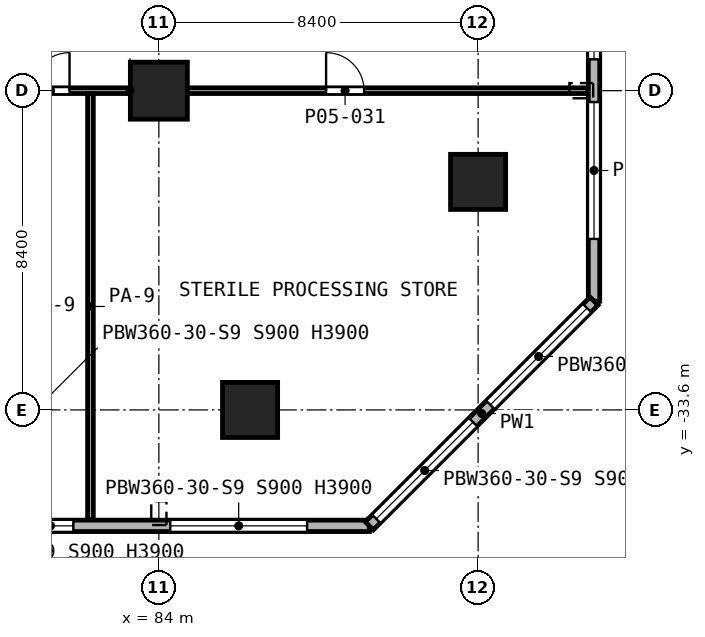
"""IFC4 building model, lengths in metres.
Left out: names, types, materials, properties, quantities, classifications, styles, units other than length and angle.
Written with IfcOpenShell. Run it as: python <this file> out.ifc"""

import sys

from ifc_helpers import new_model, si_unit, direction, frame, frame_2d, origin, origin_2d, place, context, subcontext, project, spatial, rectangle, extrude, element, fill, save


model = new_model("IFC4")
c1 = context("Model", 3, precision=1e-05, world=origin(), true_north=direction((0.0, 1.0)))
c2 = subcontext(c1, "Body", "Model", "MODEL_VIEW")
j1 = project(units=[si_unit("LENGTHUNIT", "METRE"), si_unit("PLANEANGLEUNIT", "RADIAN")], contexts=[c1])
p1 = place(None, origin())
s1 = spatial("IfcSite", under=j1, at=p1, CompositionType="ELEMENT")
p2 = place(p1, origin())
s2 = spatial("IfcBuilding", under=s1, at=p2, CompositionType="ELEMENT")
p3 = place(p2, frame((0.0, 0.0, 23.8)))
s3 = spatial("IfcBuildingStorey", under=s2, at=p3, CompositionType="ELEMENT", Elevation=23.8)
p4 = place(p3, frame((84.0, -25.2, 0.0), z_axis=(0.0, 0.0, 1.0), x_axis=(1.0, 0.0, 0.0)))
e1 = element("IfcColumn", 1, at=p4, inside=s3, PredefinedType="COLUMN", context=c2, shape_type="SweptSolid", body=[
    extrude(rectangle(XDim=1.5, YDim=1.5, at=origin_2d()), origin(), (0.0, 0.0, 1.0), 5.2),
])
for number, where, z_axis, x_axis in (
    (2, (92.4, -27.6, 0.0), (0.0, 0.0, 1.0), (1.0, 0.0, 0.0)),
    (3, (86.4, -33.6, 0.0), (0.0, 0.0, 1.0), (1.0, 0.0, 0.0)),
):
    element("IfcColumn", number, at=place(p3, frame(where, z_axis=z_axis, x_axis=x_axis)), inside=s3, PredefinedType="COLUMN", context=c2, shape_type="SweptSolid", body=[
        extrude(rectangle(XDim=1.45, YDim=1.45, at=origin_2d()), origin(), (0.0, 0.0, 1.0), 5.2),
    ])
p5 = place(p3, frame((42.738, -36.65, 0.0), z_axis=(0.0, 0.0, 1.0), x_axis=(1.0, 0.0, 0.0)))
e4 = element("IfcWall", 4, at=p5, inside=s3, PredefinedType="SOLIDWALL", context=c2, shape_type="SweptSolid", body=[
    extrude(rectangle(XDim=46.8, YDim=0.3, at=frame_2d((23.4, 0.0))), origin(), (0.0, 0.0, 1.0), 4.85),
])
p6 = place(p5, frame((0.562, 0.0, 0.9)))
e5 = element("IfcOpeningElement", 5, at=p6, cuts=e4, PredefinedType="OPENING", context=c2, shape_type="SweptSolid", body=[
    extrude(rectangle(XDim=2.4, YDim=3.0, at=frame_2d((1.2, 1.5))), frame((0.0, 0.16, 0.0), z_axis=(0.0, -1.0, 0.0), x_axis=(1.0, 0.0, 0.0)), (0.0, 0.0, 1.0), 0.32),
])
p7 = place(p5, frame((3.762, 0.0, 0.9)))
e6 = element("IfcOpeningElement", 6, at=p7, cuts=e4, PredefinedType="OPENING", context=c2, shape_type="SweptSolid", body=[
    extrude(rectangle(XDim=3.6, YDim=3.0, at=frame_2d((1.8, 1.5))), frame((0.0, 0.16, 0.0), z_axis=(0.0, -1.0, 0.0), x_axis=(1.0, 0.0, 0.0)), (0.0, 0.0, 1.0), 0.32),
])
p8 = place(p5, frame((7.962, 0.0, 0.9)))
e7 = element("IfcOpeningElement", 7, at=p8, cuts=e4, PredefinedType="OPENING", context=c2, shape_type="SweptSolid", body=[
    extrude(rectangle(XDim=3.6, YDim=3.0, at=frame_2d((1.8, 1.5))), frame((0.0, 0.16, 0.0), z_axis=(0.0, -1.0, 0.0), x_axis=(1.0, 0.0, 0.0)), (0.0, 0.0, 1.0), 0.32),
])
p9 = place(p5, frame((12.162, 0.0, 0.9)))
e8 = element("IfcOpeningElement", 8, at=p9, cuts=e4, PredefinedType="OPENING", context=c2, shape_type="SweptSolid", body=[
    extrude(rectangle(XDim=3.6, YDim=3.0, at=frame_2d((1.8, 1.5))), frame((0.0, 0.16, 0.0), z_axis=(0.0, -1.0, 0.0), x_axis=(1.0, 0.0, 0.0)), (0.0, 0.0, 1.0), 0.32),
])
p10 = place(p5, frame((16.362, 0.0, 0.9)))
e9 = element("IfcOpeningElement", 9, at=p10, cuts=e4, PredefinedType="OPENING", context=c2, shape_type="SweptSolid", body=[
    extrude(rectangle(XDim=3.6, YDim=3.0, at=frame_2d((1.8, 1.5))), frame((0.0, 0.16, 0.0), z_axis=(0.0, -1.0, 0.0), x_axis=(1.0, 0.0, 0.0)), (0.0, 0.0, 1.0), 0.32),
])
p11 = place(p5, frame((20.562, 0.0, 0.9)))
e10 = element("IfcOpeningElement", 10, at=p11, cuts=e4, PredefinedType="OPENING", context=c2, shape_type="SweptSolid", body=[
    extrude(rectangle(XDim=3.6, YDim=3.0, at=frame_2d((1.8, 1.5))), frame((0.0, 0.16, 0.0), z_axis=(0.0, -1.0, 0.0), x_axis=(1.0, 0.0, 0.0)), (0.0, 0.0, 1.0), 0.32),
])
p12 = place(p5, frame((25.287, 0.0, 0.9)))
e11 = element("IfcOpeningElement", 11, at=p12, cuts=e4, PredefinedType="OPENING", context=c2, shape_type="SweptSolid", body=[
    extrude(rectangle(XDim=2.4, YDim=3.0, at=frame_2d((1.2, 1.5))), frame((0.0, 0.16, 0.0), z_axis=(0.0, -1.0, 0.0), x_axis=(1.0, 0.0, 0.0)), (0.0, 0.0, 1.0), 0.32),
])
p13 = place(p5, frame((28.962, 0.0, 0.9)))
e12 = element("IfcOpeningElement", 12, at=p13, cuts=e4, PredefinedType="OPENING", context=c2, shape_type="SweptSolid", body=[
    extrude(rectangle(XDim=3.6, YDim=3.0, at=frame_2d((1.8, 1.5))), frame((0.0, 0.16, 0.0), z_axis=(0.0, -1.0, 0.0), x_axis=(1.0, 0.0, 0.0)), (0.0, 0.0, 1.0), 0.32),
])
p14 = place(p5, frame((33.162, 0.0, 0.9)))
e13 = element("IfcOpeningElement", 13, at=p14, cuts=e4, PredefinedType="OPENING", context=c2, shape_type="SweptSolid", body=[
    extrude(rectangle(XDim=3.6, YDim=3.0, at=frame_2d((1.8, 1.5))), frame((0.0, 0.16, 0.0), z_axis=(0.0, -1.0, 0.0), x_axis=(1.0, 0.0, 0.0)), (0.0, 0.0, 1.0), 0.32),
])
p15 = place(p5, frame((37.812, 0.0, 0.9)))
e14 = element("IfcOpeningElement", 14, at=p15, cuts=e4, PredefinedType="OPENING", context=c2, shape_type="SweptSolid", body=[
    extrude(rectangle(XDim=1.2, YDim=3.0, at=frame_2d((0.6, 1.5))), frame((0.0, 0.16, 0.0), z_axis=(0.0, -1.0, 0.0), x_axis=(1.0, 0.0, 0.0)), (0.0, 0.0, 1.0), 0.32),
])
p16 = place(p5, frame((41.562, 0.0, 0.9)))
e15 = element("IfcOpeningElement", 15, at=p16, cuts=e4, PredefinedType="OPENING", context=c2, shape_type="SweptSolid", body=[
    extrude(rectangle(XDim=3.6, YDim=3.0, at=frame_2d((1.8, 1.5))), frame((0.0, 0.16, 0.0), z_axis=(0.0, -1.0, 0.0), x_axis=(1.0, 0.0, 0.0)), (0.0, 0.0, 1.0), 0.32),
])
p17 = place(p3, frame((89.538, -36.65, 0.0), z_axis=(0.0, 0.0, 1.0), x_axis=(0.707106781187, 0.707106781187, 0.0)))
e16 = element("IfcWall", 16, at=p17, inside=s3, PredefinedType="SOLIDWALL", context=c2, shape_type="SweptSolid", body=[
    extrude(rectangle(XDim=8.361, YDim=0.3, at=frame_2d((4.181, 0.0))), origin(), (0.0, 0.0, 1.0), 4.85),
])
p18 = place(p17, frame((0.259, 0.0, 0.9)))
e17 = element("IfcOpeningElement", 17, at=p18, cuts=e16, PredefinedType="OPENING", context=c2, shape_type="SweptSolid", body=[
    extrude(rectangle(XDim=3.6, YDim=3.0, at=frame_2d((1.8, 1.5))), frame((0.0, 0.16, 0.0), z_axis=(0.0, -1.0, 0.0), x_axis=(1.0, 0.0, 0.0)), (0.0, 0.0, 1.0), 0.32),
])
p19 = place(p17, frame((4.502, 0.0, 0.9)))
e18 = element("IfcOpeningElement", 18, at=p19, cuts=e16, PredefinedType="OPENING", context=c2, shape_type="SweptSolid", body=[
    extrude(rectangle(XDim=3.6, YDim=3.0, at=frame_2d((1.8, 1.5))), frame((0.0, 0.16, 0.0), z_axis=(0.0, -1.0, 0.0), x_axis=(1.0, 0.0, 0.0)), (0.0, 0.0, 1.0), 0.32),
])
p20 = place(p3, frame((95.45, -30.738, 0.0), z_axis=(0.0, 0.0, 1.0), x_axis=(0.0, 1.0, 0.0)))
e19 = element("IfcWall", 19, at=p20, inside=s3, PredefinedType="SOLIDWALL", context=c2, shape_type="SweptSolid", body=[
    extrude(rectangle(XDim=27.876, YDim=0.3, at=frame_2d((13.938, 0.0))), origin(), (0.0, 0.0, 1.0), 4.85),
])
p21 = place(p20, frame((1.638, 0.0, 0.9)))
e20 = element("IfcOpeningElement", 20, at=p21, cuts=e19, PredefinedType="OPENING", context=c2, shape_type="SweptSolid", body=[
    extrude(rectangle(XDim=3.6, YDim=3.0, at=frame_2d((1.8, 1.5))), frame((0.0, 0.16, 0.0), z_axis=(0.0, -1.0, 0.0), x_axis=(1.0, 0.0, 0.0)), (0.0, 0.0, 1.0), 0.32),
])
p22 = place(p20, frame((6.363, 0.0, 0.9)))
e21 = element("IfcOpeningElement", 21, at=p22, cuts=e19, PredefinedType="OPENING", context=c2, shape_type="SweptSolid", body=[
    extrude(rectangle(XDim=1.2, YDim=3.0, at=frame_2d((0.6, 1.5))), frame((0.0, 0.16, 0.0), z_axis=(0.0, -1.0, 0.0), x_axis=(1.0, 0.0, 0.0)), (0.0, 0.0, 1.0), 0.32),
])
p23 = place(p20, frame((10.038, 0.0, 0.9)))
e22 = element("IfcOpeningElement", 22, at=p23, cuts=e19, PredefinedType="OPENING", context=c2, shape_type="SweptSolid", body=[
    extrude(rectangle(XDim=3.6, YDim=3.0, at=frame_2d((1.8, 1.5))), frame((0.0, 0.16, 0.0), z_axis=(0.0, -1.0, 0.0), x_axis=(1.0, 0.0, 0.0)), (0.0, 0.0, 1.0), 0.32),
])
p24 = place(p20, frame((14.238, 0.0, 0.9)))
e23 = element("IfcOpeningElement", 23, at=p24, cuts=e19, PredefinedType="OPENING", context=c2, shape_type="SweptSolid", body=[
    extrude(rectangle(XDim=3.6, YDim=3.0, at=frame_2d((1.8, 1.5))), frame((0.0, 0.16, 0.0), z_axis=(0.0, -1.0, 0.0), x_axis=(1.0, 0.0, 0.0)), (0.0, 0.0, 1.0), 0.32),
])
p25 = place(p20, frame((20.313, 0.0, 0.9)))
e24 = element("IfcOpeningElement", 24, at=p25, cuts=e19, PredefinedType="OPENING", context=c2, shape_type="SweptSolid", body=[
    extrude(rectangle(XDim=1.2, YDim=3.0, at=frame_2d((0.6, 1.5))), frame((0.0, 0.16, 0.0), z_axis=(0.0, -1.0, 0.0), x_axis=(1.0, 0.0, 0.0)), (0.0, 0.0, 1.0), 0.32),
])
p26 = place(p20, frame((22.638, 0.0, 0.9)))
e25 = element("IfcOpeningElement", 25, at=p26, cuts=e19, PredefinedType="OPENING", context=c2, shape_type="SweptSolid", body=[
    extrude(rectangle(XDim=3.6, YDim=3.0, at=frame_2d((1.8, 1.5))), frame((0.0, 0.16, 0.0), z_axis=(0.0, -1.0, 0.0), x_axis=(1.0, 0.0, 0.0)), (0.0, 0.0, 1.0), 0.32),
])
p27 = place(p3, frame((71.2, -25.2, 0.0), z_axis=(0.0, 0.0, 1.0), x_axis=(1.0, 0.0, 0.0)))
e26 = element("IfcWall", 26, at=p27, inside=s3, PredefinedType="PARTITIONING", context=c2, shape_type="SweptSolid", body=[
    extrude(rectangle(XDim=24.08, YDim=0.15, at=frame_2d((12.04, 0.0))), origin(), (0.0, 0.0, 1.0), 3.45),
])
p28 = place(p27, frame((2.6, 0.0, 0.0)))
e27 = element("IfcOpeningElement", 27, at=p28, cuts=e26, PredefinedType="OPENING", context=c2, shape_type="SweptSolid", body=[
    extrude(rectangle(XDim=1.0, YDim=2.1, at=frame_2d((0.5, 1.05))), frame((0.0, 0.085, 0.0), z_axis=(0.0, -1.0, 0.0), x_axis=(1.0, 0.0, 0.0)), (0.0, 0.0, 1.0), 0.17),
])
p29 = place(p27, frame((17.2, 0.0, 0.0)))
e28 = element("IfcOpeningElement", 28, at=p29, cuts=e26, PredefinedType="OPENING", context=c2, shape_type="SweptSolid", body=[
    extrude(rectangle(XDim=1.0, YDim=2.1, at=frame_2d((0.5, 1.05))), frame((0.0, 0.085, 0.0), z_axis=(0.0, -1.0, 0.0), x_axis=(1.0, 0.0, 0.0)), (0.0, 0.0, 1.0), 0.17),
])
p30 = place(p27, frame((9.45, 0.0, 0.0)))
e29 = element("IfcOpeningElement", 29, at=p30, cuts=e26, PredefinedType="OPENING", context=c2, shape_type="SweptSolid", body=[
    extrude(rectangle(XDim=1.0, YDim=2.1, at=frame_2d((0.5, 1.05))), frame((0.0, 0.085, 0.0), z_axis=(0.0, -1.0, 0.0), x_axis=(1.0, 0.0, 0.0)), (0.0, 0.0, 1.0), 0.17),
])
p31 = place(p3, frame((82.2, -36.48, 0.0), z_axis=(0.0, 0.0, 1.0), x_axis=(0.0, 1.0, 0.0)))
e30 = element("IfcWall", 30, at=p31, inside=s3, PredefinedType="PARTITIONING", context=c2, shape_type="SweptSolid", body=[
    extrude(rectangle(XDim=11.205, YDim=0.15, at=frame_2d((5.603, 0.0))), origin(), (0.0, 0.0, 1.0), 3.45),
])
p32 = place(p15, origin())
e31 = element("IfcWindow", 31, at=p32, inside=s3, PartitioningType="SINGLE_PANEL", PredefinedType="WINDOW", context=c2, shape_type="SweptSolid", body=[
    extrude(rectangle(XDim=1.2, YDim=3.0, at=frame_2d((0.6, 1.5))), frame((0.0, 0.03, 0.0), z_axis=(0.0, -1.0, 0.0), x_axis=(1.0, 0.0, 0.0)), (0.0, 0.0, 1.0), 0.06),
])
fill(e14, e31)
p33 = place(p16, origin())
e32 = element("IfcWindow", 32, at=p33, inside=s3, PartitioningType="SINGLE_PANEL", PredefinedType="WINDOW", context=c2, shape_type="SweptSolid", body=[
    extrude(rectangle(XDim=3.6, YDim=3.0, at=frame_2d((1.8, 1.5))), frame((0.0, 0.03, 0.0), z_axis=(0.0, -1.0, 0.0), x_axis=(1.0, 0.0, 0.0)), (0.0, 0.0, 1.0), 0.06),
])
fill(e15, e32)
p34 = place(p18, origin())
e33 = element("IfcWindow", 33, at=p34, inside=s3, PartitioningType="SINGLE_PANEL", PredefinedType="WINDOW", context=c2, shape_type="SweptSolid", body=[
    extrude(rectangle(XDim=3.6, YDim=3.0, at=frame_2d((1.8, 1.5))), frame((0.0, 0.03, 0.0), z_axis=(0.0, -1.0, 0.0), x_axis=(1.0, 0.0, 0.0)), (0.0, 0.0, 1.0), 0.06),
])
fill(e17, e33)
p35 = place(p19, origin())
e34 = element("IfcWindow", 34, at=p35, inside=s3, PartitioningType="SINGLE_PANEL", PredefinedType="WINDOW", context=c2, shape_type="SweptSolid", body=[
    extrude(rectangle(XDim=3.6, YDim=3.0, at=frame_2d((1.8, 1.5))), frame((0.0, 0.03, 0.0), z_axis=(0.0, -1.0, 0.0), x_axis=(1.0, 0.0, 0.0)), (0.0, 0.0, 1.0), 0.06),
])
fill(e18, e34)
p36 = place(p21, origin())
e35 = element("IfcWindow", 35, at=p36, inside=s3, PartitioningType="SINGLE_PANEL", PredefinedType="WINDOW", context=c2, shape_type="SweptSolid", body=[
    extrude(rectangle(XDim=3.6, YDim=3.0, at=frame_2d((1.8, 1.5))), frame((0.0, 0.03, 0.0), z_axis=(0.0, -1.0, 0.0), x_axis=(1.0, 0.0, 0.0)), (0.0, 0.0, 1.0), 0.06),
])
fill(e20, e35)
p37 = place(p22, origin())
e36 = element("IfcWindow", 36, at=p37, inside=s3, PartitioningType="SINGLE_PANEL", PredefinedType="WINDOW", context=c2, shape_type="SweptSolid", body=[
    extrude(rectangle(XDim=1.2, YDim=3.0, at=frame_2d((0.6, 1.5))), frame((0.0, 0.03, 0.0), z_axis=(0.0, -1.0, 0.0), x_axis=(1.0, 0.0, 0.0)), (0.0, 0.0, 1.0), 0.06),
])
fill(e21, e36)
p38 = place(p29, origin())
e37 = element("IfcDoor", 37, at=p38, inside=s3, OperationType="SINGLE_SWING_LEFT", PredefinedType="DOOR", context=c2, shape_type="SweptSolid", body=[
    extrude(rectangle(XDim=1.0, YDim=2.1, at=frame_2d((0.5, 1.05))), frame((0.0, 0.025, 0.0), z_axis=(0.0, -1.0, 0.0), x_axis=(1.0, 0.0, 0.0)), (0.0, 0.0, 1.0), 0.05),
])
fill(e28, e37)
p39 = place(p30, origin())
e38 = element("IfcDoor", 38, at=p39, inside=s3, OperationType="SINGLE_SWING_RIGHT", PredefinedType="DOOR", context=c2, shape_type="SweptSolid", body=[
    extrude(rectangle(XDim=1.0, YDim=2.1, at=frame_2d((0.5, 1.05))), frame((0.0, 0.025, 0.0), z_axis=(0.0, -1.0, 0.0), x_axis=(1.0, 0.0, 0.0)), (0.0, 0.0, 1.0), 0.05),
])
fill(e29, e38)
save(model, sys.argv[1])
